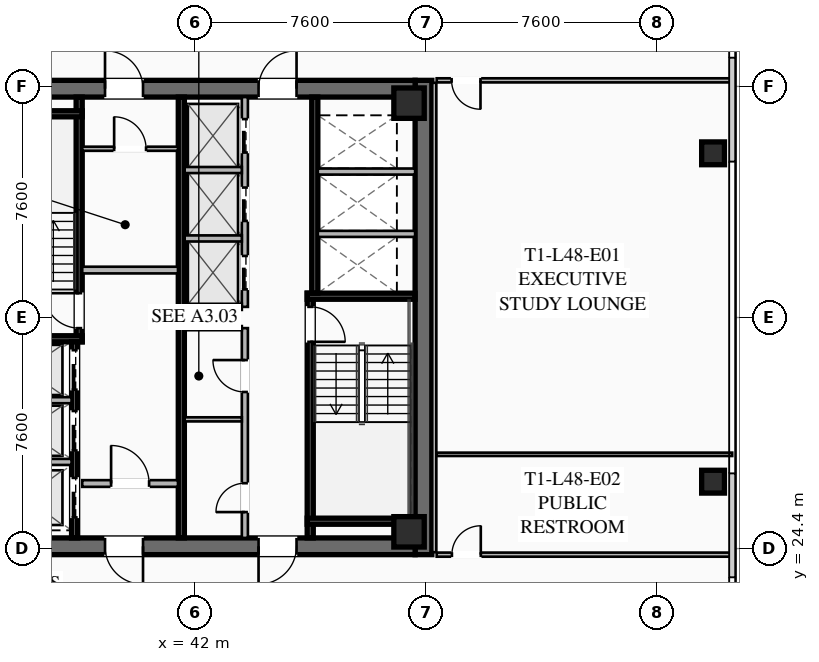
"""IFC4 building model, lengths in metres.
Left out: names, types, materials, properties, quantities, classifications, styles, units other than length and angle.
Written with IfcOpenShell. Run it as: python <this file> out.ifc"""

import sys

from ifc_helpers import new_model, si_unit, direction, frame, frame_2d, origin, origin_2d, place, context, subcontext, project, spatial, rectangle, hollow_rectangle, extrude, element, fill, save


model = new_model("IFC4")
c1 = context("Model", 3, precision=1e-05, world=origin(), true_north=direction((0.0, 1.0)))
c2 = subcontext(c1, "Body", "Model", "MODEL_VIEW")
j1 = project(units=[si_unit("LENGTHUNIT", "METRE"), si_unit("PLANEANGLEUNIT", "RADIAN")], contexts=[c1])
p1 = place(None, origin())
s1 = spatial("IfcSite", under=j1, at=p1, CompositionType="ELEMENT")
p2 = place(p1, origin())
s2 = spatial("IfcBuilding", under=s1, at=p2, CompositionType="ELEMENT")
p3 = place(p2, frame((0.0, 0.0, 178.3)))
s3 = spatial("IfcBuildingStorey", under=s2, at=p3, CompositionType="ELEMENT", Elevation=178.3)
p4 = place(p3, frame((49.525, 39.8, 0.0), z_axis=(0.0, 0.0, 1.0), x_axis=(0.0, -1.0, 0.0)))
e1 = element("IfcWall", 1, at=p4, inside=s3, PredefinedType="SHEAR", context=c2, shape_type="SweptSolid", body=[
    extrude(rectangle(XDim=15.6, YDim=0.55, at=frame_2d((7.8, 0.0))), origin(), (0.0, 0.0, 1.0), 3.55),
])
p5 = place(p3, frame((49.25, 24.475, 0.0), z_axis=(0.0, 0.0, 1.0), x_axis=(-1.0, 0.0, 0.0)))
e2 = element("IfcWall", 2, at=p5, inside=s3, PredefinedType="SHEAR", context=c2, shape_type="SweptSolid", body=[
    extrude(rectangle(XDim=14.5, YDim=0.55, at=frame_2d((7.25, 0.0))), origin(), (0.0, 0.0, 1.0), 3.55),
])
p6 = place(p5, frame((8.95, 0.0, 0.0)))
e3 = element("IfcOpeningElement", 3, at=p6, cuts=e2, PredefinedType="OPENING", context=c2, shape_type="SweptSolid", body=[
    extrude(rectangle(XDim=1.25, YDim=2.25, at=frame_2d((0.625, 1.125))), frame((0.0, 0.285, 0.0), z_axis=(0.0, -1.0, 0.0), x_axis=(1.0, 0.0, 0.0)), (0.0, 0.0, 1.0), 0.57),
])
p7 = place(p5, frame((3.9, 0.0, 0.0)))
e4 = element("IfcOpeningElement", 4, at=p7, cuts=e2, PredefinedType="OPENING", context=c2, shape_type="SweptSolid", body=[
    extrude(rectangle(XDim=1.25, YDim=2.25, at=frame_2d((0.625, 1.125))), frame((0.0, 0.285, 0.0), z_axis=(0.0, -1.0, 0.0), x_axis=(1.0, 0.0, 0.0)), (0.0, 0.0, 1.0), 0.57),
])
p8 = place(p3, frame((34.75, 39.525, 0.0), z_axis=(0.0, 0.0, 1.0), x_axis=(1.0, 0.0, 0.0)))
e5 = element("IfcWall", 5, at=p8, inside=s3, PredefinedType="SHEAR", context=c2, shape_type="SweptSolid", body=[
    extrude(rectangle(XDim=14.5, YDim=0.55, at=frame_2d((7.25, 0.0))), origin(), (0.0, 0.0, 1.0), 3.55),
])
p9 = place(p8, frame((4.3, 0.0, 0.0)))
e6 = element("IfcOpeningElement", 6, at=p9, cuts=e5, PredefinedType="OPENING", context=c2, shape_type="SweptSolid", body=[
    extrude(rectangle(XDim=1.25, YDim=2.25, at=frame_2d((0.625, 1.125))), frame((0.0, 0.285, 0.0), z_axis=(0.0, -1.0, 0.0), x_axis=(1.0, 0.0, 0.0)), (0.0, 0.0, 1.0), 0.57),
])
p10 = place(p8, frame((9.35, 0.0, 0.0)))
e7 = element("IfcOpeningElement", 7, at=p10, cuts=e5, PredefinedType="OPENING", context=c2, shape_type="SweptSolid", body=[
    extrude(rectangle(XDim=1.25, YDim=2.25, at=frame_2d((0.625, 1.125))), frame((0.0, 0.285, 0.0), z_axis=(0.0, -1.0, 0.0), x_axis=(1.0, 0.0, 0.0)), (0.0, 0.0, 1.0), 0.57),
])
for number, where, z_axis, x_axis in (
    (8, (49.05, 24.95, 0.0), (0.0, 0.0, 1.0), (1.0, 0.0, 0.0)),
    (9, (49.05, 39.05, 0.0), (0.0, 0.0, 1.0), (1.0, 0.0, 0.0)),
):
    element("IfcColumn", number, at=place(p3, frame(where, z_axis=z_axis, x_axis=x_axis)), inside=s3, PredefinedType="COLUMN", context=c2, shape_type="SweptSolid", body=[
        extrude(hollow_rectangle(XDim=1.0, YDim=1.0, WallThickness=0.04, at=origin_2d()), origin(), (0.0, 0.0, 1.0), 3.37),
    ])
for number, where, z_axis, x_axis in (
    (10, (59.05, 26.6, 0.0), (0.0, 0.0, 1.0), (1.0, 0.0, 0.0)),
    (11, (59.05, 37.4, 0.0), (0.0, 0.0, 1.0), (1.0, 0.0, 0.0)),
):
    element("IfcColumn", number, at=place(p3, frame(where, z_axis=z_axis, x_axis=x_axis)), inside=s3, PredefinedType="COLUMN", context=c2, shape_type="SweptSolid", body=[
        extrude(hollow_rectangle(XDim=0.75, YDim=0.75, WallThickness=0.032, at=origin_2d()), origin(), (0.0, 0.0, 1.0), 3.37),
    ])
p11 = place(p3, frame((38.2, 31.2, 0.0), z_axis=(0.0, 0.0, 1.0), x_axis=(0.0, 1.0, 0.0)))
e12 = element("IfcWall", 12, at=p11, inside=s3, PredefinedType="SHEAR", context=c2, shape_type="SweptSolid", body=[
    extrude(rectangle(XDim=8.05, YDim=0.2, at=frame_2d((4.025, 0.0))), origin(), (0.0, 0.0, 1.0), 3.37),
])
p12 = place(p11, frame((0.45, 0.0, 0.0)))
e13 = element("IfcOpeningElement", 13, at=p12, cuts=e12, PredefinedType="OPENING", context=c2, shape_type="SweptSolid", body=[
    extrude(rectangle(XDim=1.15, YDim=2.2, at=frame_2d((0.575, 1.1))), frame((0.0, 0.11, 0.0), z_axis=(0.0, -1.0, 0.0), x_axis=(1.0, 0.0, 0.0)), (0.0, 0.0, 1.0), 0.22),
])
for number, where, z_axis, x_axis in (
    (14, (34.75, 31.3, 0.0), (0.0, 0.0, 1.0), (1.0, 0.0, 0.0)),
    (15, (34.75, 38.7, 0.0), (0.0, 0.0, 1.0), (1.0, 0.0, 0.0)),
):
    element("IfcWall", number, at=place(p3, frame(where, z_axis=z_axis, x_axis=x_axis)), inside=s3, PredefinedType="SHEAR", context=c2, shape_type="SweptSolid", body=[
        extrude(rectangle(XDim=3.55, YDim=0.2, at=frame_2d((1.775, 0.0))), origin(), (0.0, 0.0, 1.0), 3.37),
    ])
p13 = place(p3, frame((45.8, 32.8, 0.0), z_axis=(0.0, 0.0, 1.0), x_axis=(0.0, -1.0, 0.0)))
e16 = element("IfcWall", 16, at=p13, inside=s3, PredefinedType="SHEAR", context=c2, shape_type="SweptSolid", body=[
    extrude(rectangle(XDim=8.05, YDim=0.2, at=frame_2d((4.025, 0.0))), origin(), (0.0, 0.0, 1.0), 3.37),
])
p14 = place(p13, frame((0.45, 0.0, 0.0)))
e17 = element("IfcOpeningElement", 17, at=p14, cuts=e16, PredefinedType="OPENING", context=c2, shape_type="SweptSolid", body=[
    extrude(rectangle(XDim=1.15, YDim=2.2, at=frame_2d((0.575, 1.1))), frame((0.0, 0.11, 0.0), z_axis=(0.0, -1.0, 0.0), x_axis=(1.0, 0.0, 0.0)), (0.0, 0.0, 1.0), 0.22),
])
for number, where, z_axis, x_axis in (
    (18, (45.7, 32.7, 0.0), (0.0, 0.0, 1.0), (1.0, 0.0, 0.0)),
    (19, (45.7, 25.3, 0.0), (0.0, 0.0, 1.0), (1.0, 0.0, 0.0)),
):
    element("IfcWall", number, at=place(p3, frame(where, z_axis=z_axis, x_axis=x_axis)), inside=s3, PredefinedType="SHEAR", context=c2, shape_type="SweptSolid", body=[
        extrude(rectangle(XDim=3.55, YDim=0.2, at=frame_2d((1.775, 0.0))), origin(), (0.0, 0.0, 1.0), 3.37),
    ])
p15 = place(p3, frame((41.56, 24.75, 0.0), z_axis=(0.0, 0.0, 1.0), x_axis=(0.0, 1.0, 0.0)))
e20 = element("IfcWall", 20, at=p15, inside=s3, PredefinedType="SHEAR", context=c2, shape_type="SweptSolid", body=[
    extrude(rectangle(XDim=14.5, YDim=0.2, at=frame_2d((7.25, 0.0))), origin(), (0.0, 0.0, 1.0), 3.37),
])
p16 = place(p3, frame((38.3, 33.56, 0.0), z_axis=(0.0, 0.0, 1.0), x_axis=(1.0, 0.0, 0.0)))
e21 = element("IfcWall", 21, at=p16, inside=s3, PredefinedType="SOLIDWALL", context=c2, shape_type="SweptSolid", body=[
    extrude(rectangle(XDim=3.15, YDim=0.22, at=frame_2d((1.575, 0.0))), origin(), (0.0, 0.0, 1.0), 2.723),
])
p17 = place(p3, frame((38.3, 26.54, 0.0), z_axis=(0.0, 0.0, 1.0), x_axis=(1.0, 0.0, 0.0)))
e22 = element("IfcWall", 22, at=p17, inside=s3, PredefinedType="SOLIDWALL", context=c2, shape_type="SweptSolid", body=[
    extrude(rectangle(XDim=3.15, YDim=0.22, at=frame_2d((1.575, 0.0))), origin(), (0.0, 0.0, 1.0), 2.723),
])
p18 = place(p17, frame((0.95, 0.0, 0.0)))
e23 = element("IfcOpeningElement", 23, at=p18, cuts=e22, PredefinedType="OPENING", context=c2, shape_type="SweptSolid", body=[
    extrude(rectangle(XDim=1.25, YDim=2.25, at=frame_2d((0.625, 1.125))), frame((0.0, 0.12, 0.0), z_axis=(0.0, -1.0, 0.0), x_axis=(1.0, 0.0, 0.0)), (0.0, 0.0, 1.0), 0.24),
])
p19 = place(p3, frame((38.05, 24.75, 0.0), z_axis=(0.0, 0.0, 1.0), x_axis=(0.0, 1.0, 0.0)))
e24 = element("IfcWall", 24, at=p19, inside=s3, PredefinedType="SHEAR", context=c2, shape_type="SweptSolid", body=[
    extrude(rectangle(XDim=6.45, YDim=0.2, at=frame_2d((3.225, 0.0))), origin(), (0.0, 0.0, 1.0), 3.37),
])
p20 = place(p19, frame((4.875, 0.0, 0.0)))
e25 = element("IfcOpeningElement", 25, at=p20, cuts=e24, PredefinedType="OPENING", context=c2, shape_type="SweptSolid", body=[
    extrude(rectangle(XDim=1.3, YDim=2.25, at=frame_2d((0.65, 1.125))), frame((0.0, 0.11, 0.0), z_axis=(0.0, -1.0, 0.0), x_axis=(1.0, 0.0, 0.0)), (0.0, 0.0, 1.0), 0.22),
])
p21 = place(p19, frame((2.875, 0.0, 0.0)))
e26 = element("IfcOpeningElement", 26, at=p21, cuts=e24, PredefinedType="OPENING", context=c2, shape_type="SweptSolid", body=[
    extrude(rectangle(XDim=1.3, YDim=2.25, at=frame_2d((0.65, 1.125))), frame((0.0, 0.11, 0.0), z_axis=(0.0, -1.0, 0.0), x_axis=(1.0, 0.0, 0.0)), (0.0, 0.0, 1.0), 0.22),
])
p22 = place(p19, frame((0.675, 0.0, 0.0)))
e27 = element("IfcOpeningElement", 27, at=p22, cuts=e24, PredefinedType="OPENING", context=c2, shape_type="SweptSolid", body=[
    extrude(rectangle(XDim=1.3, YDim=2.25, at=frame_2d((0.65, 1.125))), frame((0.0, 0.11, 0.0), z_axis=(0.0, -1.0, 0.0), x_axis=(1.0, 0.0, 0.0)), (0.0, 0.0, 1.0), 0.22),
])
for number, where, z_axis, x_axis in (
    (28, (34.75, 27.25, 0.0), (0.0, 0.0, 1.0), (1.0, 0.0, 0.0)),
    (29, (34.75, 29.28, 0.0), (0.0, 0.0, 1.0), (1.0, 0.0, 0.0)),
):
    element("IfcWall", number, at=place(p3, frame(where, z_axis=z_axis, x_axis=x_axis)), inside=s3, PredefinedType="SOLIDWALL", context=c2, shape_type="SweptSolid", body=[
        extrude(rectangle(XDim=3.2, YDim=0.2, at=frame_2d((1.6, 0.0))), origin(), (0.0, 0.0, 1.0), 3.37),
    ])
p23 = place(p3, frame((45.95, 39.25, 0.0), z_axis=(0.0, 0.0, 1.0), x_axis=(0.0, -1.0, 0.0)))
e30 = element("IfcWall", 30, at=p23, inside=s3, PredefinedType="SHEAR", context=c2, shape_type="SweptSolid", body=[
    extrude(rectangle(XDim=6.45, YDim=0.2, at=frame_2d((3.225, 0.0))), origin(), (0.0, 0.0, 1.0), 3.37),
])
for number, where, z_axis, x_axis in (
    (31, (46.05, 34.75, 0.0), (0.0, 0.0, 1.0), (1.0, 0.0, 0.0)),
    (32, (46.05, 36.8, 0.0), (0.0, 0.0, 1.0), (1.0, 0.0, 0.0)),
):
    element("IfcWall", number, at=place(p3, frame(where, z_axis=z_axis, x_axis=x_axis)), inside=s3, PredefinedType="SOLIDWALL", context=c2, shape_type="SweptSolid", body=[
        extrude(rectangle(XDim=3.2, YDim=0.2, at=frame_2d((1.6, 0.0))), origin(), (0.0, 0.0, 1.0), 3.37),
    ])
p24 = place(p3, frame((38.3, 37.55, 0.0), z_axis=(0.0, 0.0, 1.0), x_axis=(1.0, 0.0, 0.0)))
e33 = element("IfcWall", 33, at=p24, inside=s3, PredefinedType="PARTITIONING", context=c2, shape_type="SweptSolid", body=[
    extrude(rectangle(XDim=3.15, YDim=0.135, at=frame_2d((1.575, 0.0))), origin(), (0.0, 0.0, 1.0), 2.723),
])
p25 = place(p24, frame((1.05, 0.0, 0.0)))
e34 = element("IfcOpeningElement", 34, at=p25, cuts=e33, PredefinedType="OPENING", context=c2, shape_type="SweptSolid", body=[
    extrude(rectangle(XDim=1.05, YDim=2.2, at=frame_2d((0.525, 1.1))), frame((0.0, 0.077, 0.0), z_axis=(0.0, -1.0, 0.0), x_axis=(1.0, 0.0, 0.0)), (0.0, 0.0, 1.0), 0.155),
])
p26 = place(p3, frame((43.65, 24.75, 0.0), z_axis=(0.0, 0.0, 1.0), x_axis=(0.0, 1.0, 0.0)))
e35 = element("IfcWall", 35, at=p26, inside=s3, PredefinedType="SOLIDWALL", context=c2, shape_type="SweptSolid", body=[
    extrude(rectangle(XDim=6.9, YDim=0.2, at=frame_2d((3.45, 0.0))), origin(), (0.0, 0.0, 1.0), 2.723),
])
p27 = place(p26, frame((0.85, 0.0, 0.0)))
e36 = element("IfcOpeningElement", 36, at=p27, cuts=e35, PredefinedType="OPENING", context=c2, shape_type="SweptSolid", body=[
    extrude(rectangle(XDim=0.95, YDim=2.05, at=frame_2d((0.475, 1.025))), frame((0.0, 0.11, 0.0), z_axis=(0.0, -1.0, 0.0), x_axis=(1.0, 0.0, 0.0)), (0.0, 0.0, 1.0), 0.22),
])
p28 = place(p26, frame((4.8, 0.0, 0.0)))
e37 = element("IfcOpeningElement", 37, at=p28, cuts=e35, PredefinedType="OPENING", context=c2, shape_type="SweptSolid", body=[
    extrude(rectangle(XDim=1.05, YDim=2.2, at=frame_2d((0.525, 1.1))), frame((0.0, 0.11, 0.0), z_axis=(0.0, -1.0, 0.0), x_axis=(1.0, 0.0, 0.0)), (0.0, 0.0, 1.0), 0.22),
])
for number, where, z_axis, x_axis in (
    (38, (41.67, 31.65, 0.0), (0.0, 0.0, 1.0), (1.0, 0.0, 0.0)),
    (39, (41.67, 28.65, 0.0), (0.0, 0.0, 1.0), (1.0, 0.0, 0.0)),
):
    element("IfcWall", number, at=place(p3, frame(where, z_axis=z_axis, x_axis=x_axis)), inside=s3, PredefinedType="PARTITIONING", context=c2, shape_type="SweptSolid", body=[
        extrude(rectangle(XDim=1.88, YDim=0.135, at=frame_2d((0.94, 0.0))), origin(), (0.0, 0.0, 1.0), 2.723),
    ])
p29 = place(p3, frame((43.65, 32.35, 0.0), z_axis=(0.0, 0.0, 1.0), x_axis=(0.0, 1.0, 0.0)))
e40 = element("IfcWall", 40, at=p29, inside=s3, PredefinedType="SOLIDWALL", context=c2, shape_type="SweptSolid", body=[
    extrude(rectangle(XDim=6.9, YDim=0.2, at=frame_2d((3.45, 0.0))), origin(), (0.0, 0.0, 1.0), 3.37),
])
p30 = place(p29, frame((0.575, 0.0, 0.0)))
e41 = element("IfcOpeningElement", 41, at=p30, cuts=e40, PredefinedType="OPENING", context=c2, shape_type="SweptSolid", body=[
    extrude(rectangle(XDim=1.1, YDim=2.2, at=frame_2d((0.55, 1.1))), frame((0.0, 0.11, 0.0), z_axis=(0.0, -1.0, 0.0), x_axis=(1.0, 0.0, 0.0)), (0.0, 0.0, 1.0), 0.22),
])
p31 = place(p29, frame((2.825, 0.0, 0.0)))
e42 = element("IfcOpeningElement", 42, at=p31, cuts=e40, PredefinedType="OPENING", context=c2, shape_type="SweptSolid", body=[
    extrude(rectangle(XDim=1.1, YDim=2.2, at=frame_2d((0.55, 1.1))), frame((0.0, 0.11, 0.0), z_axis=(0.0, -1.0, 0.0), x_axis=(1.0, 0.0, 0.0)), (0.0, 0.0, 1.0), 0.22),
])
p32 = place(p29, frame((5.075, 0.0, 0.0)))
e43 = element("IfcOpeningElement", 43, at=p32, cuts=e40, PredefinedType="OPENING", context=c2, shape_type="SweptSolid", body=[
    extrude(rectangle(XDim=1.1, YDim=2.2, at=frame_2d((0.55, 1.1))), frame((0.0, 0.11, 0.0), z_axis=(0.0, -1.0, 0.0), x_axis=(1.0, 0.0, 0.0)), (0.0, 0.0, 1.0), 0.22),
])
for number, where, z_axis, x_axis in (
    (44, (41.67, 32.35, 0.0), (0.0, 0.0, 1.0), (1.0, 0.0, 0.0)),
    (45, (41.67, 34.6, 0.0), (0.0, 0.0, 1.0), (1.0, 0.0, 0.0)),
    (46, (41.67, 36.85, 0.0), (0.0, 0.0, 1.0), (1.0, 0.0, 0.0)),
):
    element("IfcWall", number, at=place(p3, frame(where, z_axis=z_axis, x_axis=x_axis)), inside=s3, PredefinedType="SOLIDWALL", context=c2, shape_type="SweptSolid", body=[
        extrude(rectangle(XDim=1.88, YDim=0.2, at=frame_2d((0.94, 0.0))), origin(), (0.0, 0.0, 1.0), 3.37),
    ])
p33 = place(p3, frame((49.88, 39.72, 0.0), z_axis=(0.0, 0.0, 1.0), x_axis=(0.0, -1.0, 0.0)))
e47 = element("IfcWall", 47, at=p33, inside=s3, PredefinedType="PARTITIONING", context=c2, shape_type="SweptSolid", body=[
    extrude(rectangle(XDim=15.44, YDim=0.135, at=frame_2d((7.72, 0.0))), origin(), (0.0, 0.0, 1.0), 2.723),
])
p34 = place(p3, frame((59.68, 39.8, 0.0), z_axis=(0.0, 0.0, 1.0), x_axis=(-1.0, 0.0, 0.0)))
e48 = element("IfcWall", 48, at=p34, inside=s3, PredefinedType="PARTITIONING", context=c2, shape_type="SweptSolid", body=[
    extrude(rectangle(XDim=9.72, YDim=0.135, at=frame_2d((4.86, 0.0))), origin(), (0.0, 0.0, 1.0), 2.723),
])
p35 = place(p34, frame((8.28, 0.0, 0.0)))
e49 = element("IfcOpeningElement", 49, at=p35, cuts=e48, PredefinedType="OPENING", context=c2, shape_type="SweptSolid", body=[
    extrude(rectangle(XDim=0.95, YDim=2.05, at=frame_2d((0.475, 1.025))), frame((0.0, 0.077, 0.0), z_axis=(0.0, -1.0, 0.0), x_axis=(1.0, 0.0, 0.0)), (0.0, 0.0, 1.0), 0.155),
])
p36 = place(p3, frame((49.96, 24.2, 0.0), z_axis=(0.0, 0.0, 1.0), x_axis=(1.0, 0.0, 0.0)))
e50 = element("IfcWall", 50, at=p36, inside=s3, PredefinedType="PARTITIONING", context=c2, shape_type="SweptSolid", body=[
    extrude(rectangle(XDim=9.72, YDim=0.135, at=frame_2d((4.86, 0.0))), origin(), (0.0, 0.0, 1.0), 2.723),
])
p37 = place(p36, frame((0.5, 0.0, 0.0)))
e51 = element("IfcOpeningElement", 51, at=p37, cuts=e50, PredefinedType="OPENING", context=c2, shape_type="SweptSolid", body=[
    extrude(rectangle(XDim=0.95, YDim=2.05, at=frame_2d((0.475, 1.025))), frame((0.0, 0.077, 0.0), z_axis=(0.0, -1.0, 0.0), x_axis=(1.0, 0.0, 0.0)), (0.0, 0.0, 1.0), 0.155),
])
p38 = place(p3, frame((49.96, 27.5, 0.0), z_axis=(0.0, 0.0, 1.0), x_axis=(1.0, 0.0, 0.0)))
e52 = element("IfcWall", 52, at=p38, inside=s3, PredefinedType="PARTITIONING", context=c2, shape_type="SweptSolid", body=[
    extrude(rectangle(XDim=9.72, YDim=0.11, at=frame_2d((4.86, 0.0))), origin(), (0.0, 0.0, 1.0), 2.723),
])
p39 = place(p9, origin())
e53 = element("IfcDoor", 53, at=p39, inside=s3, OperationType="SINGLE_SWING_LEFT", PredefinedType="DOOR", context=c2, shape_type="SweptSolid", body=[
    extrude(rectangle(XDim=1.25, YDim=2.25, at=frame_2d((0.625, 1.125))), frame((0.0, 0.025, 0.0), z_axis=(0.0, -1.0, 0.0), x_axis=(1.0, 0.0, 0.0)), (0.0, 0.0, 1.0), 0.05),
])
fill(e6, e53)
p40 = place(p10, origin())
e54 = element("IfcDoor", 54, at=p40, inside=s3, OperationType="SINGLE_SWING_RIGHT", PredefinedType="DOOR", context=c2, shape_type="SweptSolid", body=[
    extrude(rectangle(XDim=1.25, YDim=2.25, at=frame_2d((0.625, 1.125))), frame((0.0, 0.025, 0.0), z_axis=(0.0, -1.0, 0.0), x_axis=(1.0, 0.0, 0.0)), (0.0, 0.0, 1.0), 0.05),
])
fill(e7, e54)
p41 = place(p6, origin())
e55 = element("IfcDoor", 55, at=p41, inside=s3, OperationType="SINGLE_SWING_LEFT", PredefinedType="DOOR", context=c2, shape_type="SweptSolid", body=[
    extrude(rectangle(XDim=1.25, YDim=2.25, at=frame_2d((0.625, 1.125))), frame((0.0, 0.025, 0.0), z_axis=(0.0, -1.0, 0.0), x_axis=(1.0, 0.0, 0.0)), (0.0, 0.0, 1.0), 0.05),
])
fill(e3, e55)
p42 = place(p7, origin())
e56 = element("IfcDoor", 56, at=p42, inside=s3, OperationType="SINGLE_SWING_RIGHT", PredefinedType="DOOR", context=c2, shape_type="SweptSolid", body=[
    extrude(rectangle(XDim=1.25, YDim=2.25, at=frame_2d((0.625, 1.125))), frame((0.0, 0.025, 0.0), z_axis=(0.0, -1.0, 0.0), x_axis=(1.0, 0.0, 0.0)), (0.0, 0.0, 1.0), 0.05),
])
fill(e4, e56)
p43 = place(p12, origin())
e57 = element("IfcDoor", 57, at=p43, inside=s3, OperationType="SINGLE_SWING_RIGHT", PredefinedType="DOOR", context=c2, shape_type="SweptSolid", body=[
    extrude(rectangle(XDim=1.15, YDim=2.2, at=frame_2d((0.575, 1.1))), frame((0.0, 0.025, 0.0), z_axis=(0.0, -1.0, 0.0), x_axis=(1.0, 0.0, 0.0)), (0.0, 0.0, 1.0), 0.05),
])
fill(e13, e57)
p44 = place(p14, origin())
e58 = element("IfcDoor", 58, at=p44, inside=s3, OperationType="SINGLE_SWING_RIGHT", PredefinedType="DOOR", context=c2, shape_type="SweptSolid", body=[
    extrude(rectangle(XDim=1.15, YDim=2.2, at=frame_2d((0.575, 1.1))), frame((0.0, 0.025, 0.0), z_axis=(0.0, -1.0, 0.0), x_axis=(1.0, 0.0, 0.0)), (0.0, 0.0, 1.0), 0.05),
])
fill(e17, e58)
p45 = place(p18, origin())
e59 = element("IfcDoor", 59, at=p45, inside=s3, OperationType="SINGLE_SWING_LEFT", PredefinedType="DOOR", context=c2, shape_type="SweptSolid", body=[
    extrude(rectangle(XDim=1.25, YDim=2.25, at=frame_2d((0.625, 1.125))), frame((0.0, 0.025, 0.0), z_axis=(0.0, -1.0, 0.0), x_axis=(1.0, 0.0, 0.0)), (0.0, 0.0, 1.0), 0.05),
])
fill(e23, e59)
p46 = place(p25, origin())
e60 = element("IfcDoor", 60, at=p46, inside=s3, OperationType="SINGLE_SWING_LEFT", PredefinedType="DOOR", context=c2, shape_type="SweptSolid", body=[
    extrude(rectangle(XDim=1.05, YDim=2.2, at=frame_2d((0.525, 1.1))), frame((0.0, 0.025, 0.0), z_axis=(0.0, -1.0, 0.0), x_axis=(1.0, 0.0, 0.0)), (0.0, 0.0, 1.0), 0.05),
])
fill(e34, e60)
p47 = place(p27, origin())
e61 = element("IfcDoor", 61, at=p47, inside=s3, OperationType="SINGLE_SWING_LEFT", PredefinedType="DOOR", context=c2, shape_type="SweptSolid", body=[
    extrude(rectangle(XDim=0.95, YDim=2.05, at=frame_2d((0.475, 1.025))), frame((0.0, 0.025, 0.0), z_axis=(0.0, -1.0, 0.0), x_axis=(1.0, 0.0, 0.0)), (0.0, 0.0, 1.0), 0.05),
])
fill(e36, e61)
p48 = place(p28, origin())
e62 = element("IfcDoor", 62, at=p48, inside=s3, OperationType="SINGLE_SWING_RIGHT", PredefinedType="DOOR", context=c2, shape_type="SweptSolid", body=[
    extrude(rectangle(XDim=1.05, YDim=2.2, at=frame_2d((0.525, 1.1))), frame((0.0, 0.025, 0.0), z_axis=(0.0, -1.0, 0.0), x_axis=(1.0, 0.0, 0.0)), (0.0, 0.0, 1.0), 0.05),
])
fill(e37, e62)
p49 = place(p35, origin())
e63 = element("IfcDoor", 63, at=p49, inside=s3, OperationType="SINGLE_SWING_LEFT", PredefinedType="DOOR", context=c2, shape_type="SweptSolid", body=[
    extrude(rectangle(XDim=0.95, YDim=2.05, at=frame_2d((0.475, 1.025))), frame((0.0, 0.025, 0.0), z_axis=(0.0, -1.0, 0.0), x_axis=(1.0, 0.0, 0.0)), (0.0, 0.0, 1.0), 0.05),
])
fill(e49, e63)
p50 = place(p37, origin())
e64 = element("IfcDoor", 64, at=p50, inside=s3, OperationType="SINGLE_SWING_RIGHT", PredefinedType="DOOR", context=c2, shape_type="SweptSolid", body=[
    extrude(rectangle(XDim=0.95, YDim=2.05, at=frame_2d((0.475, 1.025))), frame((0.0, 0.025, 0.0), z_axis=(0.0, -1.0, 0.0), x_axis=(1.0, 0.0, 0.0)), (0.0, 0.0, 1.0), 0.05),
])
fill(e51, e64)
p51 = place(p20, origin())
e65 = element("IfcDoor", 65, at=p51, inside=s3, OperationType="SLIDING_TO_LEFT", PredefinedType="DOOR", context=c2, shape_type="SweptSolid", body=[
    extrude(rectangle(XDim=1.3, YDim=2.25, at=frame_2d((0.65, 1.125))), frame((0.0, 0.025, 0.0), z_axis=(0.0, -1.0, 0.0), x_axis=(1.0, 0.0, 0.0)), (0.0, 0.0, 1.0), 0.05),
])
fill(e25, e65)
p52 = place(p21, origin())
e66 = element("IfcDoor", 66, at=p52, inside=s3, OperationType="SLIDING_TO_LEFT", PredefinedType="DOOR", context=c2, shape_type="SweptSolid", body=[
    extrude(rectangle(XDim=1.3, YDim=2.25, at=frame_2d((0.65, 1.125))), frame((0.0, 0.025, 0.0), z_axis=(0.0, -1.0, 0.0), x_axis=(1.0, 0.0, 0.0)), (0.0, 0.0, 1.0), 0.05),
])
fill(e26, e66)
p53 = place(p22, origin())
e67 = element("IfcDoor", 67, at=p53, inside=s3, OperationType="SLIDING_TO_LEFT", PredefinedType="DOOR", context=c2, shape_type="SweptSolid", body=[
    extrude(rectangle(XDim=1.3, YDim=2.25, at=frame_2d((0.65, 1.125))), frame((0.0, 0.025, 0.0), z_axis=(0.0, -1.0, 0.0), x_axis=(1.0, 0.0, 0.0)), (0.0, 0.0, 1.0), 0.05),
])
fill(e27, e67)
p54 = place(p30, origin())
e68 = element("IfcDoor", 68, at=p54, inside=s3, OperationType="SLIDING_TO_LEFT", PredefinedType="DOOR", context=c2, shape_type="SweptSolid", body=[
    extrude(rectangle(XDim=1.1, YDim=2.2, at=frame_2d((0.55, 1.1))), frame((0.0, 0.025, 0.0), z_axis=(0.0, -1.0, 0.0), x_axis=(1.0, 0.0, 0.0)), (0.0, 0.0, 1.0), 0.05),
])
fill(e41, e68)
p55 = place(p31, origin())
e69 = element("IfcDoor", 69, at=p55, inside=s3, OperationType="SLIDING_TO_LEFT", PredefinedType="DOOR", context=c2, shape_type="SweptSolid", body=[
    extrude(rectangle(XDim=1.1, YDim=2.2, at=frame_2d((0.55, 1.1))), frame((0.0, 0.025, 0.0), z_axis=(0.0, -1.0, 0.0), x_axis=(1.0, 0.0, 0.0)), (0.0, 0.0, 1.0), 0.05),
])
fill(e42, e69)
p56 = place(p32, origin())
e70 = element("IfcDoor", 70, at=p56, inside=s3, OperationType="SLIDING_TO_LEFT", PredefinedType="DOOR", context=c2, shape_type="SweptSolid", body=[
    extrude(rectangle(XDim=1.1, YDim=2.2, at=frame_2d((0.55, 1.1))), frame((0.0, 0.025, 0.0), z_axis=(0.0, -1.0, 0.0), x_axis=(1.0, 0.0, 0.0)), (0.0, 0.0, 1.0), 0.05),
])
fill(e43, e70)
save(model, sys.argv[1])
